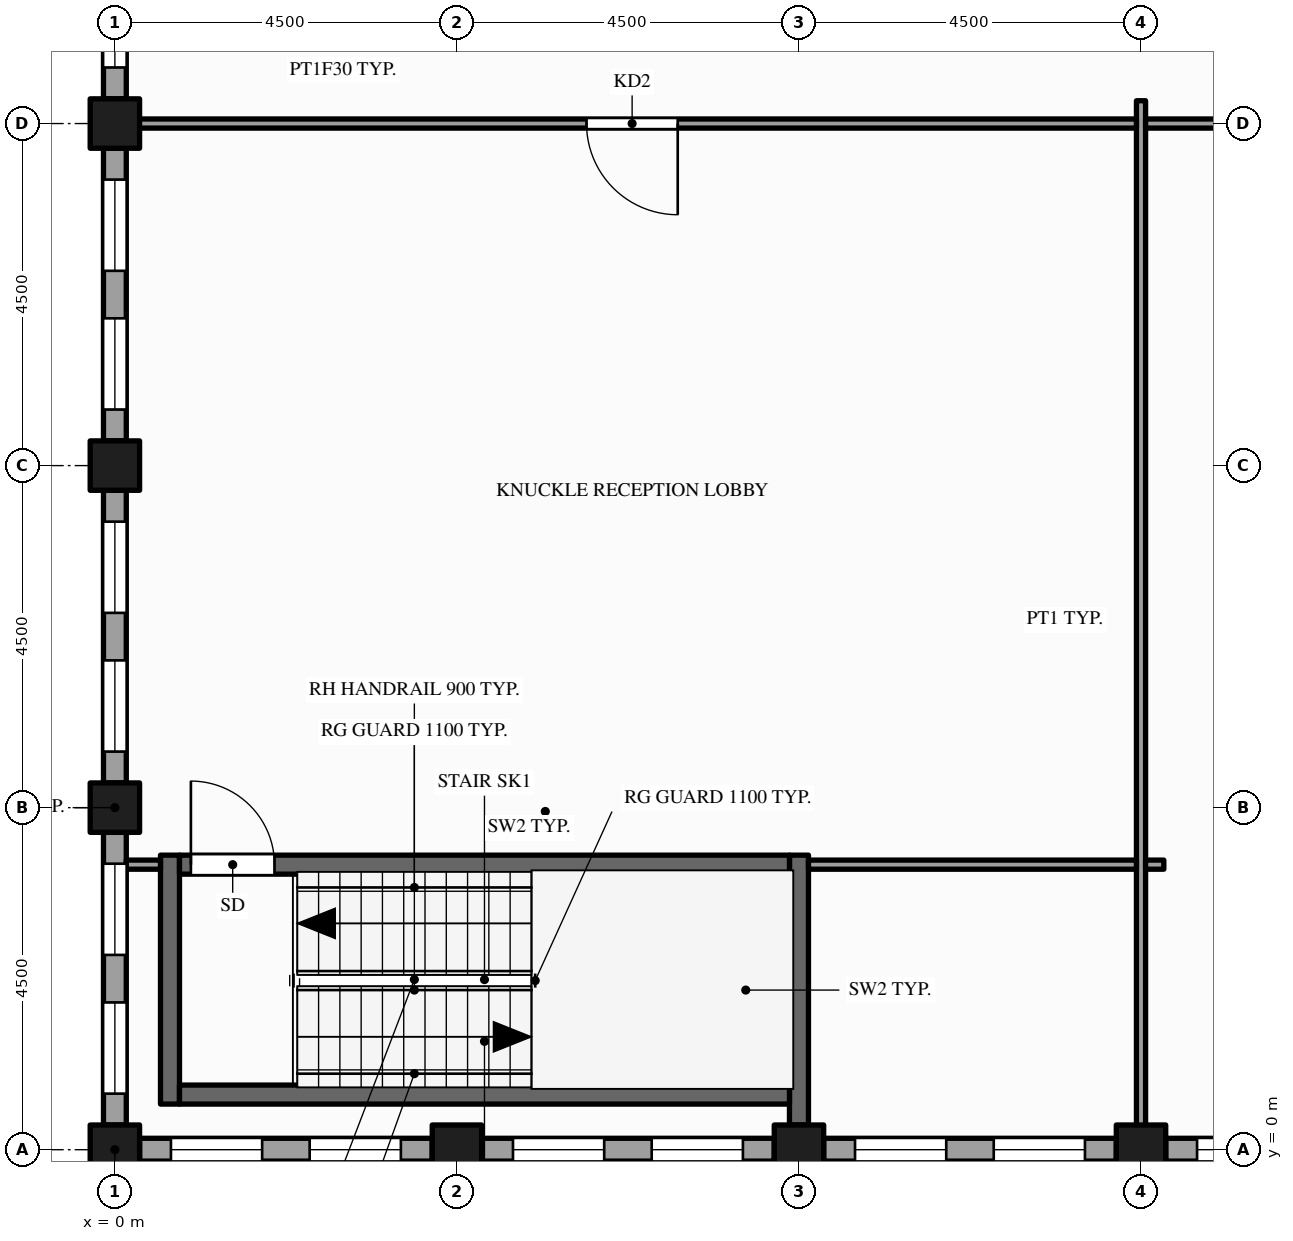
"""IFC4 building model, lengths in metres.
Left out: names, types, materials, properties, quantities, classifications, styles, units other than length and angle.
Written with IfcOpenShell. Run it as: python <this file> out.ifc"""

import sys

from ifc_helpers import new_model, si_unit, direction, frame, frame_2d, origin, origin_2d, place, context, subcontext, project, spatial, rectangle, hollow_rectangle, extrude, element, fill, save


model = new_model("IFC4")
c1 = context("Model", 3, precision=1e-05, world=origin(), true_north=direction((0.0, 1.0)))
c2 = subcontext(c1, "Body", "Model", "MODEL_VIEW")
j1 = project(units=[si_unit("LENGTHUNIT", "METRE"), si_unit("PLANEANGLEUNIT", "RADIAN")], contexts=[c1])
p1 = place(None, origin())
s1 = spatial("IfcSite", under=j1, at=p1, CompositionType="ELEMENT")
p2 = place(p1, origin())
s2 = spatial("IfcBuilding", under=s1, at=p2, CompositionType="ELEMENT")
p3 = place(p2, frame((0.0, 0.0, 285.0)))
s3 = spatial("IfcBuildingStorey", under=s2, at=p3, CompositionType="ELEMENT", Elevation=285.0)
for number, where, z_axis, x_axis in (
    (1, (0.0, 0.0, -0.15), (0.0, 0.0, 1.0), (1.0, 0.0, 0.0)),
    (2, (0.0, 4.5, -0.15), (0.0, 0.0, 1.0), (1.0, 0.0, 0.0)),
    (3, (0.0, 9.0, -0.15), (0.0, 0.0, 1.0), (1.0, 0.0, 0.0)),
    (4, (0.0, 13.5, -0.15), (0.0, 0.0, 1.0), (1.0, 0.0, 0.0)),
    (5, (4.5, 0.0, -0.15), (0.0, 0.0, 1.0), (1.0, 0.0, 0.0)),
    (6, (9.0, 0.0, -0.15), (0.0, 0.0, 1.0), (1.0, 0.0, 0.0)),
    (7, (13.5, 0.0, -0.15), (0.0, 0.0, 1.0), (1.0, 0.0, 0.0)),
):
    element("IfcColumn", number, at=place(p3, frame(where, z_axis=z_axis, x_axis=x_axis)), inside=s3, PredefinedType="COLUMN", context=c2, shape_type="SweptSolid", body=[
        extrude(hollow_rectangle(XDim=0.65, YDim=0.65, WallThickness=0.032, at=origin_2d()), origin(), (0.0, 0.0, 1.0), 4.0),
    ])
p4 = place(p3, frame((0.0, 17.675, 0.0), z_axis=(0.0, 0.0, 1.0), x_axis=(0.0, -1.0, 0.0)))
e8 = element("IfcWall", 8, at=p4, inside=s3, PredefinedType="STANDARD", context=c2, shape_type="SweptSolid", body=[
    extrude(rectangle(XDim=3.85, YDim=0.3, at=frame_2d((1.925, 0.0))), origin(), (0.0, 0.0, 1.0), 3.162),
])
p5 = place(p4, frame((0.413, 0.0, 0.9)))
e9 = element("IfcOpeningElement", 9, at=p5, cuts=e8, PredefinedType="OPENING", context=c2, shape_type="SweptSolid", body=[
    extrude(rectangle(XDim=1.2, YDim=2.0, at=frame_2d((0.6, 1.0))), frame((0.0, 0.16, 0.0), z_axis=(0.0, -1.0, 0.0), x_axis=(1.0, 0.0, 0.0)), (0.0, 0.0, 1.0), 0.32),
])
p6 = place(p4, frame((2.238, 0.0, 0.9)))
e10 = element("IfcOpeningElement", 10, at=p6, cuts=e8, PredefinedType="OPENING", context=c2, shape_type="SweptSolid", body=[
    extrude(rectangle(XDim=1.2, YDim=2.0, at=frame_2d((0.6, 1.0))), frame((0.0, 0.16, 0.0), z_axis=(0.0, -1.0, 0.0), x_axis=(1.0, 0.0, 0.0)), (0.0, 0.0, 1.0), 0.32),
])
p7 = place(p3, frame((0.0, 13.175, 0.0), z_axis=(0.0, 0.0, 1.0), x_axis=(0.0, -1.0, 0.0)))
e11 = element("IfcWall", 11, at=p7, inside=s3, PredefinedType="STANDARD", context=c2, shape_type="SweptSolid", body=[
    extrude(rectangle(XDim=3.85, YDim=0.3, at=frame_2d((1.925, 0.0))), origin(), (0.0, 0.0, 1.0), 3.162),
])
p8 = place(p7, frame((0.413, 0.0, 0.9)))
e12 = element("IfcOpeningElement", 12, at=p8, cuts=e11, PredefinedType="OPENING", context=c2, shape_type="SweptSolid", body=[
    extrude(rectangle(XDim=1.2, YDim=2.0, at=frame_2d((0.6, 1.0))), frame((0.0, 0.16, 0.0), z_axis=(0.0, -1.0, 0.0), x_axis=(1.0, 0.0, 0.0)), (0.0, 0.0, 1.0), 0.32),
])
p9 = place(p7, frame((2.238, 0.0, 0.9)))
e13 = element("IfcOpeningElement", 13, at=p9, cuts=e11, PredefinedType="OPENING", context=c2, shape_type="SweptSolid", body=[
    extrude(rectangle(XDim=1.2, YDim=2.0, at=frame_2d((0.6, 1.0))), frame((0.0, 0.16, 0.0), z_axis=(0.0, -1.0, 0.0), x_axis=(1.0, 0.0, 0.0)), (0.0, 0.0, 1.0), 0.32),
])
p10 = place(p3, frame((0.0, 8.675, 0.0), z_axis=(0.0, 0.0, 1.0), x_axis=(0.0, -1.0, 0.0)))
e14 = element("IfcWall", 14, at=p10, inside=s3, PredefinedType="STANDARD", context=c2, shape_type="SweptSolid", body=[
    extrude(rectangle(XDim=3.85, YDim=0.3, at=frame_2d((1.925, 0.0))), origin(), (0.0, 0.0, 1.0), 3.162),
])
p11 = place(p10, frame((0.413, 0.0, 0.9)))
e15 = element("IfcOpeningElement", 15, at=p11, cuts=e14, PredefinedType="OPENING", context=c2, shape_type="SweptSolid", body=[
    extrude(rectangle(XDim=1.2, YDim=2.0, at=frame_2d((0.6, 1.0))), frame((0.0, 0.16, 0.0), z_axis=(0.0, -1.0, 0.0), x_axis=(1.0, 0.0, 0.0)), (0.0, 0.0, 1.0), 0.32),
])
p12 = place(p10, frame((2.238, 0.0, 0.9)))
e16 = element("IfcOpeningElement", 16, at=p12, cuts=e14, PredefinedType="OPENING", context=c2, shape_type="SweptSolid", body=[
    extrude(rectangle(XDim=1.2, YDim=2.0, at=frame_2d((0.6, 1.0))), frame((0.0, 0.16, 0.0), z_axis=(0.0, -1.0, 0.0), x_axis=(1.0, 0.0, 0.0)), (0.0, 0.0, 1.0), 0.32),
])
p13 = place(p3, frame((0.0, 4.175, 0.0), z_axis=(0.0, 0.0, 1.0), x_axis=(0.0, -1.0, 0.0)))
e17 = element("IfcWall", 17, at=p13, inside=s3, PredefinedType="STANDARD", context=c2, shape_type="SweptSolid", body=[
    extrude(rectangle(XDim=3.85, YDim=0.3, at=frame_2d((1.925, 0.0))), origin(), (0.0, 0.0, 1.0), 3.162),
])
p14 = place(p13, frame((0.413, 0.0, 0.9)))
e18 = element("IfcOpeningElement", 18, at=p14, cuts=e17, PredefinedType="OPENING", context=c2, shape_type="SweptSolid", body=[
    extrude(rectangle(XDim=1.2, YDim=2.0, at=frame_2d((0.6, 1.0))), frame((0.0, 0.16, 0.0), z_axis=(0.0, -1.0, 0.0), x_axis=(1.0, 0.0, 0.0)), (0.0, 0.0, 1.0), 0.32),
])
p15 = place(p13, frame((2.238, 0.0, 0.9)))
e19 = element("IfcOpeningElement", 19, at=p15, cuts=e17, PredefinedType="OPENING", context=c2, shape_type="SweptSolid", body=[
    extrude(rectangle(XDim=1.2, YDim=2.0, at=frame_2d((0.6, 1.0))), frame((0.0, 0.16, 0.0), z_axis=(0.0, -1.0, 0.0), x_axis=(1.0, 0.0, 0.0)), (0.0, 0.0, 1.0), 0.32),
])
p16 = place(p3, frame((0.325, 0.0, 0.0), z_axis=(0.0, 0.0, 1.0), x_axis=(1.0, 0.0, 0.0)))
e20 = element("IfcWall", 20, at=p16, inside=s3, PredefinedType="STANDARD", context=c2, shape_type="SweptSolid", body=[
    extrude(rectangle(XDim=3.85, YDim=0.3, at=frame_2d((1.925, 0.0))), origin(), (0.0, 0.0, 1.0), 3.162),
])
p17 = place(p16, frame((0.413, 0.0, 0.9)))
e21 = element("IfcOpeningElement", 21, at=p17, cuts=e20, PredefinedType="OPENING", context=c2, shape_type="SweptSolid", body=[
    extrude(rectangle(XDim=1.2, YDim=2.0, at=frame_2d((0.6, 1.0))), frame((0.0, 0.16, 0.0), z_axis=(0.0, -1.0, 0.0), x_axis=(1.0, 0.0, 0.0)), (0.0, 0.0, 1.0), 0.32),
])
p18 = place(p16, frame((2.238, 0.0, 0.9)))
e22 = element("IfcOpeningElement", 22, at=p18, cuts=e20, PredefinedType="OPENING", context=c2, shape_type="SweptSolid", body=[
    extrude(rectangle(XDim=1.2, YDim=2.0, at=frame_2d((0.6, 1.0))), frame((0.0, 0.16, 0.0), z_axis=(0.0, -1.0, 0.0), x_axis=(1.0, 0.0, 0.0)), (0.0, 0.0, 1.0), 0.32),
])
p19 = place(p3, frame((4.825, 0.0, 0.0), z_axis=(0.0, 0.0, 1.0), x_axis=(1.0, 0.0, 0.0)))
e23 = element("IfcWall", 23, at=p19, inside=s3, PredefinedType="STANDARD", context=c2, shape_type="SweptSolid", body=[
    extrude(rectangle(XDim=3.85, YDim=0.3, at=frame_2d((1.925, 0.0))), origin(), (0.0, 0.0, 1.0), 3.162),
])
p20 = place(p19, frame((0.413, 0.0, 0.9)))
e24 = element("IfcOpeningElement", 24, at=p20, cuts=e23, PredefinedType="OPENING", context=c2, shape_type="SweptSolid", body=[
    extrude(rectangle(XDim=1.2, YDim=2.0, at=frame_2d((0.6, 1.0))), frame((0.0, 0.16, 0.0), z_axis=(0.0, -1.0, 0.0), x_axis=(1.0, 0.0, 0.0)), (0.0, 0.0, 1.0), 0.32),
])
p21 = place(p19, frame((2.238, 0.0, 0.9)))
e25 = element("IfcOpeningElement", 25, at=p21, cuts=e23, PredefinedType="OPENING", context=c2, shape_type="SweptSolid", body=[
    extrude(rectangle(XDim=1.2, YDim=2.0, at=frame_2d((0.6, 1.0))), frame((0.0, 0.16, 0.0), z_axis=(0.0, -1.0, 0.0), x_axis=(1.0, 0.0, 0.0)), (0.0, 0.0, 1.0), 0.32),
])
p22 = place(p3, frame((9.325, 0.0, 0.0), z_axis=(0.0, 0.0, 1.0), x_axis=(1.0, 0.0, 0.0)))
e26 = element("IfcWall", 26, at=p22, inside=s3, PredefinedType="STANDARD", context=c2, shape_type="SweptSolid", body=[
    extrude(rectangle(XDim=3.85, YDim=0.3, at=frame_2d((1.925, 0.0))), origin(), (0.0, 0.0, 1.0), 2.87),
])
p23 = place(p22, frame((0.413, 0.0, 0.9)))
e27 = element("IfcOpeningElement", 27, at=p23, cuts=e26, PredefinedType="OPENING", context=c2, shape_type="SweptSolid", body=[
    extrude(rectangle(XDim=1.2, YDim=1.75, at=frame_2d((0.6, 0.875))), frame((0.0, 0.16, 0.0), z_axis=(0.0, -1.0, 0.0), x_axis=(1.0, 0.0, 0.0)), (0.0, 0.0, 1.0), 0.32),
])
p24 = place(p22, frame((2.238, 0.0, 0.9)))
e28 = element("IfcOpeningElement", 28, at=p24, cuts=e26, PredefinedType="OPENING", context=c2, shape_type="SweptSolid", body=[
    extrude(rectangle(XDim=1.2, YDim=1.75, at=frame_2d((0.6, 0.875))), frame((0.0, 0.16, 0.0), z_axis=(0.0, -1.0, 0.0), x_axis=(1.0, 0.0, 0.0)), (0.0, 0.0, 1.0), 0.32),
])
p25 = place(p3, frame((13.825, 0.0, 0.0), z_axis=(0.0, 0.0, 1.0), x_axis=(1.0, 0.0, 0.0)))
e29 = element("IfcWall", 29, at=p25, inside=s3, PredefinedType="STANDARD", context=c2, shape_type="SweptSolid", body=[
    extrude(rectangle(XDim=3.85, YDim=0.3, at=frame_2d((1.925, 0.0))), origin(), (0.0, 0.0, 1.0), 2.87),
])
p26 = place(p25, frame((0.413, 0.0, 0.9)))
e30 = element("IfcOpeningElement", 30, at=p26, cuts=e29, PredefinedType="OPENING", context=c2, shape_type="SweptSolid", body=[
    extrude(rectangle(XDim=1.2, YDim=1.75, at=frame_2d((0.6, 0.875))), frame((0.0, 0.16, 0.0), z_axis=(0.0, -1.0, 0.0), x_axis=(1.0, 0.0, 0.0)), (0.0, 0.0, 1.0), 0.32),
])
p27 = place(p25, frame((2.238, 0.0, 0.9)))
e31 = element("IfcOpeningElement", 31, at=p27, cuts=e29, PredefinedType="OPENING", context=c2, shape_type="SweptSolid", body=[
    extrude(rectangle(XDim=1.2, YDim=1.75, at=frame_2d((0.6, 0.875))), frame((0.0, 0.16, 0.0), z_axis=(0.0, -1.0, 0.0), x_axis=(1.0, 0.0, 0.0)), (0.0, 0.0, 1.0), 0.32),
])
p28 = place(p3, frame((0.725, 0.6, 0.0), z_axis=(0.0, 0.0, 1.0), x_axis=(0.0, 1.0, 0.0)))
e32 = element("IfcWall", 32, at=p28, inside=s3, PredefinedType="SHEAR", context=c2, shape_type="SweptSolid", body=[
    extrude(rectangle(XDim=3.275, YDim=0.25, at=frame_2d((1.637, 0.0))), origin(), (0.0, 0.0, 1.0), 3.85),
])
p29 = place(p3, frame((9.0, 0.325, 0.0), z_axis=(0.0, 0.0, 1.0), x_axis=(0.0, 1.0, 0.0)))
e33 = element("IfcWall", 33, at=p29, inside=s3, PredefinedType="SHEAR", context=c2, shape_type="SweptSolid", body=[
    extrude(rectangle(XDim=3.55, YDim=0.25, at=frame_2d((1.775, 0.0))), origin(), (0.0, 0.0, 1.0), 3.85),
])
p30 = place(p3, frame((13.5, 0.15, 0.0), z_axis=(0.0, 0.0, 1.0), x_axis=(0.0, 1.0, 0.0)))
e34 = element("IfcWall", 34, at=p30, inside=s3, PredefinedType="PARTITIONING", context=c2, shape_type="SweptSolid", body=[
    extrude(rectangle(XDim=13.65, YDim=0.12, at=frame_2d((6.825, 0.0))), origin(), (0.0, 0.0, 1.0), 2.87),
])
p31 = place(p3, frame((0.85, 0.725, 0.0), z_axis=(0.0, 0.0, 1.0), x_axis=(1.0, 0.0, 0.0)))
e35 = element("IfcWall", 35, at=p31, inside=s3, PredefinedType="SHEAR", context=c2, shape_type="SweptSolid", body=[
    extrude(rectangle(XDim=8.025, YDim=0.25, at=frame_2d((4.012, 0.0))), origin(), (0.0, 0.0, 1.0), 3.85),
])
p32 = place(p3, frame((0.15, 3.75, 0.0), z_axis=(0.0, 0.0, 1.0), x_axis=(1.0, 0.0, 0.0)))
e36 = element("IfcWall", 36, at=p32, inside=s3, PredefinedType="PARTITIONING", context=c2, shape_type="SweptSolid", body=[
    extrude(rectangle(XDim=0.45, YDim=0.12, at=frame_2d((0.225, 0.0))), origin(), (0.0, 0.0, 1.0), 3.85),
])
p33 = place(p3, frame((0.85, 3.75, 0.0), z_axis=(0.0, 0.0, 1.0), x_axis=(1.0, 0.0, 0.0)))
e37 = element("IfcWall", 37, at=p33, inside=s3, PredefinedType="SHEAR", context=c2, shape_type="SweptSolid", body=[
    extrude(rectangle(XDim=8.025, YDim=0.25, at=frame_2d((4.012, 0.0))), origin(), (0.0, 0.0, 1.0), 3.85),
])
p34 = place(p33, frame((0.15, 0.0, 0.0)))
e38 = element("IfcOpeningElement", 38, at=p34, cuts=e37, PredefinedType="OPENING", context=c2, shape_type="SweptSolid", body=[
    extrude(rectangle(XDim=1.1, YDim=2.1, at=frame_2d((0.55, 1.05))), frame((0.0, 0.135, 0.0), z_axis=(0.0, -1.0, 0.0), x_axis=(1.0, 0.0, 0.0)), (0.0, 0.0, 1.0), 0.27),
])
p35 = place(p3, frame((9.125, 3.75, 0.0), z_axis=(0.0, 0.0, 1.0), x_axis=(1.0, 0.0, 0.0)))
e39 = element("IfcWall", 39, at=p35, inside=s3, PredefinedType="PARTITIONING", context=c2, shape_type="SweptSolid", body=[
    extrude(rectangle(XDim=4.315, YDim=0.12, at=frame_2d((2.157, 0.0))), origin(), (0.0, 0.0, 1.0), 2.87),
])
p36 = place(p3, frame((13.56, 3.75, 0.0), z_axis=(0.0, 0.0, 1.0), x_axis=(1.0, 0.0, 0.0)))
e40 = element("IfcWall", 40, at=p36, inside=s3, PredefinedType="PARTITIONING", context=c2, shape_type="SweptSolid", body=[
    extrude(rectangle(XDim=0.24, YDim=0.12, at=frame_2d((0.12, 0.0))), origin(), (0.0, 0.0, 1.0), 2.87),
])
p37 = place(p3, frame((0.15, 13.5, 0.0), z_axis=(0.0, 0.0, 1.0), x_axis=(1.0, 0.0, 0.0)))
e41 = element("IfcWall", 41, at=p37, inside=s3, PredefinedType="PARTITIONING", context=c2, shape_type="SweptSolid", body=[
    extrude(rectangle(XDim=13.29, YDim=0.12, at=frame_2d((6.645, 0.0))), origin(), (0.0, 0.0, 1.0), 2.87),
])
p38 = place(p37, frame((6.055, 0.0, 0.0)))
e42 = element("IfcOpeningElement", 42, at=p38, cuts=e41, PredefinedType="OPENING", context=c2, shape_type="SweptSolid", body=[
    extrude(rectangle(XDim=1.2, YDim=2.1, at=frame_2d((0.6, 1.05))), frame((0.0, 0.07, 0.0), z_axis=(0.0, -1.0, 0.0), x_axis=(1.0, 0.0, 0.0)), (0.0, 0.0, 1.0), 0.14),
])
p39 = place(p3, frame((13.56, 13.5, 0.0), z_axis=(0.0, 0.0, 1.0), x_axis=(1.0, 0.0, 0.0)))
e43 = element("IfcWall", 43, at=p39, inside=s3, PredefinedType="PARTITIONING", context=c2, shape_type="SweptSolid", body=[
    extrude(rectangle(XDim=6.63, YDim=0.12, at=frame_2d((3.315, 0.0))), origin(), (0.0, 0.0, 1.0), 2.87),
])
p40 = place(p39, frame((2.815, 0.0, 0.0)))
e44 = element("IfcOpeningElement", 44, at=p40, cuts=e43, PredefinedType="OPENING", context=c2, shape_type="SweptSolid", body=[
    extrude(rectangle(XDim=1.0, YDim=2.1, at=frame_2d((0.5, 1.05))), frame((0.0, 0.07, 0.0), z_axis=(0.0, -1.0, 0.0), x_axis=(1.0, 0.0, 0.0)), (0.0, 0.0, 1.0), 0.14),
])
p41 = place(p6, origin())
e45 = element("IfcWindow", 45, at=p41, inside=s3, PartitioningType="SINGLE_PANEL", PredefinedType="WINDOW", context=c2, shape_type="SweptSolid", body=[
    extrude(rectangle(XDim=1.2, YDim=2.0, at=frame_2d((0.6, 1.0))), frame((0.0, 0.03, 0.0), z_axis=(0.0, -1.0, 0.0), x_axis=(1.0, 0.0, 0.0)), (0.0, 0.0, 1.0), 0.06),
])
fill(e10, e45)
p42 = place(p8, origin())
e46 = element("IfcWindow", 46, at=p42, inside=s3, PartitioningType="SINGLE_PANEL", PredefinedType="WINDOW", context=c2, shape_type="SweptSolid", body=[
    extrude(rectangle(XDim=1.2, YDim=2.0, at=frame_2d((0.6, 1.0))), frame((0.0, 0.03, 0.0), z_axis=(0.0, -1.0, 0.0), x_axis=(1.0, 0.0, 0.0)), (0.0, 0.0, 1.0), 0.06),
])
fill(e12, e46)
p43 = place(p9, origin())
e47 = element("IfcWindow", 47, at=p43, inside=s3, PartitioningType="SINGLE_PANEL", PredefinedType="WINDOW", context=c2, shape_type="SweptSolid", body=[
    extrude(rectangle(XDim=1.2, YDim=2.0, at=frame_2d((0.6, 1.0))), frame((0.0, 0.03, 0.0), z_axis=(0.0, -1.0, 0.0), x_axis=(1.0, 0.0, 0.0)), (0.0, 0.0, 1.0), 0.06),
])
fill(e13, e47)
p44 = place(p11, origin())
e48 = element("IfcWindow", 48, at=p44, inside=s3, PartitioningType="SINGLE_PANEL", PredefinedType="WINDOW", context=c2, shape_type="SweptSolid", body=[
    extrude(rectangle(XDim=1.2, YDim=2.0, at=frame_2d((0.6, 1.0))), frame((0.0, 0.03, 0.0), z_axis=(0.0, -1.0, 0.0), x_axis=(1.0, 0.0, 0.0)), (0.0, 0.0, 1.0), 0.06),
])
fill(e15, e48)
p45 = place(p12, origin())
e49 = element("IfcWindow", 49, at=p45, inside=s3, PartitioningType="SINGLE_PANEL", PredefinedType="WINDOW", context=c2, shape_type="SweptSolid", body=[
    extrude(rectangle(XDim=1.2, YDim=2.0, at=frame_2d((0.6, 1.0))), frame((0.0, 0.03, 0.0), z_axis=(0.0, -1.0, 0.0), x_axis=(1.0, 0.0, 0.0)), (0.0, 0.0, 1.0), 0.06),
])
fill(e16, e49)
p46 = place(p14, origin())
e50 = element("IfcWindow", 50, at=p46, inside=s3, PartitioningType="SINGLE_PANEL", PredefinedType="WINDOW", context=c2, shape_type="SweptSolid", body=[
    extrude(rectangle(XDim=1.2, YDim=2.0, at=frame_2d((0.6, 1.0))), frame((0.0, 0.03, 0.0), z_axis=(0.0, -1.0, 0.0), x_axis=(1.0, 0.0, 0.0)), (0.0, 0.0, 1.0), 0.06),
])
fill(e18, e50)
p47 = place(p15, origin())
e51 = element("IfcWindow", 51, at=p47, inside=s3, PartitioningType="SINGLE_PANEL", PredefinedType="WINDOW", context=c2, shape_type="SweptSolid", body=[
    extrude(rectangle(XDim=1.2, YDim=2.0, at=frame_2d((0.6, 1.0))), frame((0.0, 0.03, 0.0), z_axis=(0.0, -1.0, 0.0), x_axis=(1.0, 0.0, 0.0)), (0.0, 0.0, 1.0), 0.06),
])
fill(e19, e51)
p48 = place(p17, origin())
e52 = element("IfcWindow", 52, at=p48, inside=s3, PartitioningType="SINGLE_PANEL", PredefinedType="WINDOW", context=c2, shape_type="SweptSolid", body=[
    extrude(rectangle(XDim=1.2, YDim=2.0, at=frame_2d((0.6, 1.0))), frame((0.0, 0.03, 0.0), z_axis=(0.0, -1.0, 0.0), x_axis=(1.0, 0.0, 0.0)), (0.0, 0.0, 1.0), 0.06),
])
fill(e21, e52)
p49 = place(p18, origin())
e53 = element("IfcWindow", 53, at=p49, inside=s3, PartitioningType="SINGLE_PANEL", PredefinedType="WINDOW", context=c2, shape_type="SweptSolid", body=[
    extrude(rectangle(XDim=1.2, YDim=2.0, at=frame_2d((0.6, 1.0))), frame((0.0, 0.03, 0.0), z_axis=(0.0, -1.0, 0.0), x_axis=(1.0, 0.0, 0.0)), (0.0, 0.0, 1.0), 0.06),
])
fill(e22, e53)
p50 = place(p20, origin())
e54 = element("IfcWindow", 54, at=p50, inside=s3, PartitioningType="SINGLE_PANEL", PredefinedType="WINDOW", context=c2, shape_type="SweptSolid", body=[
    extrude(rectangle(XDim=1.2, YDim=2.0, at=frame_2d((0.6, 1.0))), frame((0.0, 0.03, 0.0), z_axis=(0.0, -1.0, 0.0), x_axis=(1.0, 0.0, 0.0)), (0.0, 0.0, 1.0), 0.06),
])
fill(e24, e54)
p51 = place(p21, origin())
e55 = element("IfcWindow", 55, at=p51, inside=s3, PartitioningType="SINGLE_PANEL", PredefinedType="WINDOW", context=c2, shape_type="SweptSolid", body=[
    extrude(rectangle(XDim=1.2, YDim=2.0, at=frame_2d((0.6, 1.0))), frame((0.0, 0.03, 0.0), z_axis=(0.0, -1.0, 0.0), x_axis=(1.0, 0.0, 0.0)), (0.0, 0.0, 1.0), 0.06),
])
fill(e25, e55)
p52 = place(p23, origin())
e56 = element("IfcWindow", 56, at=p52, inside=s3, PartitioningType="SINGLE_PANEL", PredefinedType="WINDOW", context=c2, shape_type="SweptSolid", body=[
    extrude(rectangle(XDim=1.2, YDim=1.75, at=frame_2d((0.6, 0.875))), frame((0.0, 0.03, 0.0), z_axis=(0.0, -1.0, 0.0), x_axis=(1.0, 0.0, 0.0)), (0.0, 0.0, 1.0), 0.06),
])
fill(e27, e56)
p53 = place(p24, origin())
e57 = element("IfcWindow", 57, at=p53, inside=s3, PartitioningType="SINGLE_PANEL", PredefinedType="WINDOW", context=c2, shape_type="SweptSolid", body=[
    extrude(rectangle(XDim=1.2, YDim=1.75, at=frame_2d((0.6, 0.875))), frame((0.0, 0.03, 0.0), z_axis=(0.0, -1.0, 0.0), x_axis=(1.0, 0.0, 0.0)), (0.0, 0.0, 1.0), 0.06),
])
fill(e28, e57)
p54 = place(p26, origin())
e58 = element("IfcWindow", 58, at=p54, inside=s3, PartitioningType="SINGLE_PANEL", PredefinedType="WINDOW", context=c2, shape_type="SweptSolid", body=[
    extrude(rectangle(XDim=1.2, YDim=1.75, at=frame_2d((0.6, 0.875))), frame((0.0, 0.03, 0.0), z_axis=(0.0, -1.0, 0.0), x_axis=(1.0, 0.0, 0.0)), (0.0, 0.0, 1.0), 0.06),
])
fill(e30, e58)
p55 = place(p34, origin())
e59 = element("IfcDoor", 59, at=p55, inside=s3, OperationType="SINGLE_SWING_LEFT", PredefinedType="DOOR", context=c2, shape_type="SweptSolid", body=[
    extrude(rectangle(XDim=1.1, YDim=2.1, at=frame_2d((0.55, 1.05))), frame((0.0, 0.025, 0.0), z_axis=(0.0, -1.0, 0.0), x_axis=(1.0, 0.0, 0.0)), (0.0, 0.0, 1.0), 0.05),
])
fill(e38, e59)
p56 = place(p38, origin())
e60 = element("IfcDoor", 60, at=p56, inside=s3, OperationType="SINGLE_SWING_RIGHT", PredefinedType="DOOR", context=c2, shape_type="SweptSolid", body=[
    extrude(rectangle(XDim=1.2, YDim=2.1, at=frame_2d((0.6, 1.05))), frame((0.0, 0.025, 0.0), z_axis=(0.0, -1.0, 0.0), x_axis=(1.0, 0.0, 0.0)), (0.0, 0.0, 1.0), 0.05),
])
fill(e42, e60)
save(model, sys.argv[1])
